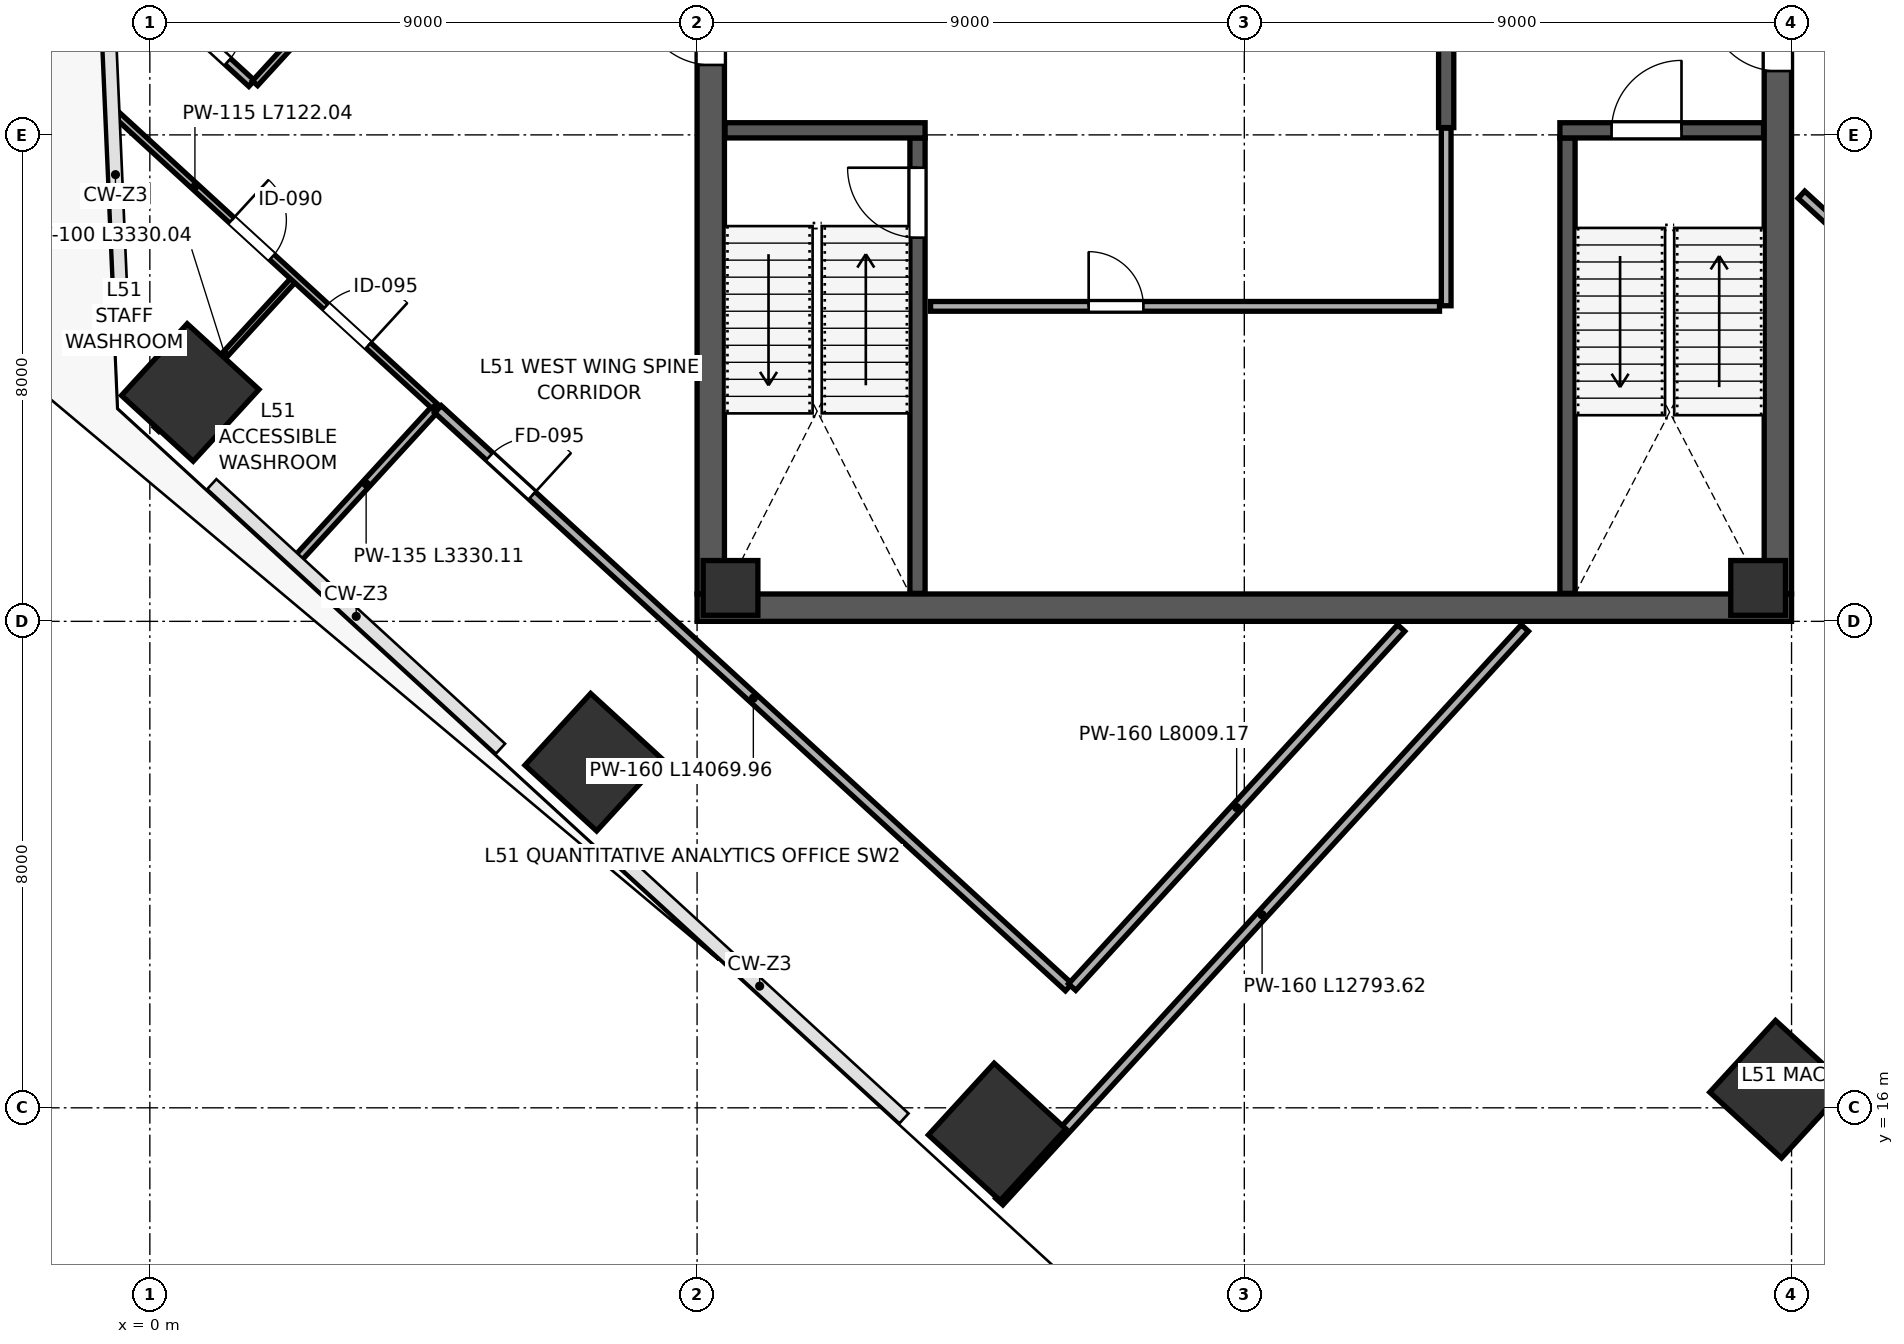
"""IFC4 building model, lengths in metres.
Left out: names, types, materials, properties, quantities, classifications, styles, units other than length and angle.
Written with IfcOpenShell. Run it as: python <this file> out.ifc"""

import sys

from ifc_helpers import new_model, si_unit, direction, frame, frame_2d, origin, origin_2d, place, context, subcontext, project, spatial, rectangle, extrude, source, transform, mapped, element, fill, save


model = new_model("IFC4")
c1 = context("Model", 3, precision=1e-05, world=origin(), true_north=direction((0.0, 1.0)))
c2 = subcontext(c1, "Body", "Model", "MODEL_VIEW")
j1 = project(units=[si_unit("LENGTHUNIT", "METRE"), si_unit("PLANEANGLEUNIT", "RADIAN")], contexts=[c1])
p1 = place(None, origin())
s1 = spatial("IfcSite", under=j1, at=p1, CompositionType="ELEMENT")
p2 = place(p1, origin())
s2 = spatial("IfcBuilding", under=s1, at=p2, CompositionType="ELEMENT")
p3 = place(p2, frame((0.0, 0.0, 229.0)))
s3 = spatial("IfcBuildingStorey", under=s2, at=p3, CompositionType="ELEMENT", Elevation=229.0)
m1 = source(origin(), c2, "Body", "SweptSolid", [
    extrude(rectangle(XDim=0.9, YDim=0.9, at=origin_2d()), origin(), (0.0, 0.0, 1.0), 4.198),
])
for number, where, z_axis, x_axis in (
    (1, (9.55, 24.55, 0.001), (0.0, 0.0, 1.0), (1.0, 0.0, 0.0)),
    (2, (26.45, 24.55, 0.001), (0.0, 0.0, 1.0), (1.0, 0.0, 0.0)),
):
    element("IfcColumn", number, at=place(p3, frame(where, z_axis=z_axis, x_axis=x_axis)), inside=s3, PredefinedType="COLUMN", context=c2, shape_type="MappedRepresentation", body=[
        mapped(m1, transform((0.0, 0.0, 0.0), scale=1.0)),
    ])
m2 = source(origin(), c2, "Body", "SweptSolid", [
    extrude(rectangle(XDim=1.6, YDim=1.6, at=origin_2d()), origin(), (0.0, 0.0, 1.0), 4.198),
])
for number, where, z_axis, x_axis in (
    (3, (0.664, 27.764, 0.001), (0.0, 0.0, 1.0), (-0.737, 0.676, 0.0)),
    (4, (7.299, 21.683, 0.001), (0.0, 0.0, 1.0), (-0.737, 0.676, 0.0)),
    (5, (13.935, 15.603, 0.001), (0.0, 0.0, 1.0), (-0.737, 0.676, 0.0)),
):
    element("IfcColumn", number, at=place(p3, frame(where, z_axis=z_axis, x_axis=x_axis)), inside=s3, PredefinedType="COLUMN", context=c2, shape_type="MappedRepresentation", body=[
        mapped(m2, transform((0.0, 0.0, 0.0), scale=1.0)),
    ])
m3 = source(origin(), c2, "Body", "SweptSolid", [
    extrude(rectangle(XDim=1.6, YDim=1.6, at=origin_2d()), origin(), (0.0, 0.0, 1.0), 4.198),
])
p4 = place(p3, frame((26.786, 16.306, 0.001), z_axis=(0.0, 0.0, 1.0), x_axis=(-0.73727733681, 0.675590207616, 0.0)))
e6 = element("IfcColumn", 6, at=p4, inside=s3, PredefinedType="COLUMN", context=c2, shape_type="MappedRepresentation", body=[
    mapped(m3, transform((0.0, 0.0, 0.0), scale=1.0)),
])
p5 = place(p3, frame((9.225, 24.45, 0.0), z_axis=(0.0, 0.0, 1.0), x_axis=(0.0, 1.0, 0.0)))
e7 = element("IfcWall", 7, at=p5, inside=s3, PredefinedType="SHEAR", context=c2, shape_type="SweptSolid", body=[
    extrude(rectangle(XDim=15.1, YDim=0.45, at=frame_2d((7.55, 0.0))), origin(), (0.0, 0.0, 1.0), 3.96),
])
p6 = place(p5, frame((8.7, 0.0, 0.0)))
e8 = element("IfcOpeningElement", 8, at=p6, cuts=e7, PredefinedType="OPENING", context=c2, shape_type="SweptSolid", body=[
    extrude(rectangle(XDim=1.15, YDim=2.2, at=frame_2d((0.575, 1.1))), frame((0.0, 0.235, 0.0), z_axis=(0.0, -1.0, 0.0), x_axis=(1.0, 0.0, 0.0)), (0.0, 0.0, 1.0), 0.47),
])
p7 = place(p3, frame((26.775, 24.45, 0.0), z_axis=(0.0, 0.0, 1.0), x_axis=(0.0, 1.0, 0.0)))
e9 = element("IfcWall", 9, at=p7, inside=s3, PredefinedType="SHEAR", context=c2, shape_type="SweptSolid", body=[
    extrude(rectangle(XDim=15.1, YDim=0.45, at=frame_2d((7.55, 0.0))), origin(), (0.0, 0.0, 1.0), 3.96),
])
p8 = place(p7, frame((8.6, 0.0, 0.0)))
e10 = element("IfcOpeningElement", 10, at=p8, cuts=e9, PredefinedType="OPENING", context=c2, shape_type="SweptSolid", body=[
    extrude(rectangle(XDim=1.15, YDim=2.2, at=frame_2d((0.575, 1.1))), frame((0.0, 0.235, 0.0), z_axis=(0.0, -1.0, 0.0), x_axis=(1.0, 0.0, 0.0)), (0.0, 0.0, 1.0), 0.47),
])
p9 = place(p3, frame((9.0, 24.225, 0.0), z_axis=(0.0, 0.0, 1.0), x_axis=(1.0, 0.0, 0.0)))
e11 = element("IfcWall", 11, at=p9, inside=s3, PredefinedType="SHEAR", context=c2, shape_type="SweptSolid", body=[
    extrude(rectangle(XDim=18.0, YDim=0.45, at=frame_2d((9.0, 0.0))), origin(), (0.0, 0.0, 1.0), 3.96),
])
p10 = place(p3, frame((12.625, 24.46, 0.0), z_axis=(0.0, 0.0, 1.0), x_axis=(0.0, 1.0, 0.0)))
e12 = element("IfcWall", 12, at=p10, inside=s3, PredefinedType="SHEAR", context=c2, shape_type="SweptSolid", body=[
    extrude(rectangle(XDim=7.49, YDim=0.25, at=frame_2d((3.745, 0.0))), origin(), (0.0, 0.0, 1.0), 3.96),
])
p11 = place(p10, frame((5.85, 0.0, 0.0)))
e13 = element("IfcOpeningElement", 13, at=p11, cuts=e12, PredefinedType="OPENING", context=c2, shape_type="SweptSolid", body=[
    extrude(rectangle(XDim=1.15, YDim=2.2, at=frame_2d((0.575, 1.1))), frame((0.0, 0.135, 0.0), z_axis=(0.0, -1.0, 0.0), x_axis=(1.0, 0.0, 0.0)), (0.0, 0.0, 1.0), 0.27),
])
p12 = place(p3, frame((9.46, 32.075, 0.0), z_axis=(0.0, 0.0, 1.0), x_axis=(1.0, 0.0, 0.0)))
e14 = element("IfcWall", 14, at=p12, inside=s3, PredefinedType="SHEAR", context=c2, shape_type="SweptSolid", body=[
    extrude(rectangle(XDim=3.29, YDim=0.25, at=frame_2d((1.645, 0.0))), origin(), (0.0, 0.0, 1.0), 3.96),
])
p13 = place(p3, frame((23.315, 24.46, 0.0), z_axis=(0.0, 0.0, 1.0), x_axis=(0.0, 1.0, 0.0)))
e15 = element("IfcWall", 15, at=p13, inside=s3, PredefinedType="SHEAR", context=c2, shape_type="SweptSolid", body=[
    extrude(rectangle(XDim=7.49, YDim=0.25, at=frame_2d((3.745, 0.0))), origin(), (0.0, 0.0, 1.0), 3.96),
])
p14 = place(p3, frame((23.19, 32.075, 0.0), z_axis=(0.0, 0.0, 1.0), x_axis=(1.0, 0.0, 0.0)))
e16 = element("IfcWall", 16, at=p14, inside=s3, PredefinedType="SHEAR", context=c2, shape_type="SweptSolid", body=[
    extrude(rectangle(XDim=3.35, YDim=0.25, at=frame_2d((1.675, 0.0))), origin(), (0.0, 0.0, 1.0), 3.96),
])
p15 = place(p14, frame((0.85, 0.0, 0.0)))
e17 = element("IfcOpeningElement", 17, at=p15, cuts=e16, PredefinedType="OPENING", context=c2, shape_type="SweptSolid", body=[
    extrude(rectangle(XDim=1.15, YDim=2.2, at=frame_2d((0.575, 1.1))), frame((0.0, 0.135, 0.0), z_axis=(0.0, -1.0, 0.0), x_axis=(1.0, 0.0, 0.0)), (0.0, 0.0, 1.0), 0.27),
])
p16 = place(p3, frame((21.32, 32.12, 0.0), z_axis=(0.0, 0.0, 1.0), x_axis=(0.0, 1.0, 0.0)))
e18 = element("IfcWall", 18, at=p16, inside=s3, PredefinedType="SHEAR", context=c2, shape_type="SweptSolid", body=[
    extrude(rectangle(XDim=7.42, YDim=0.25, at=frame_2d((3.71, 0.0))), origin(), (0.0, 0.0, 1.0), 3.96),
])
p17 = place(p16, frame((1.4, 0.0, 0.0)))
e19 = element("IfcOpeningElement", 19, at=p17, cuts=e18, PredefinedType="OPENING", context=c2, shape_type="SweptSolid", body=[
    extrude(rectangle(XDim=1.15, YDim=2.2, at=frame_2d((0.575, 1.1))), frame((0.0, 0.135, 0.0), z_axis=(0.0, -1.0, 0.0), x_axis=(1.0, 0.0, 0.0)), (0.0, 0.0, 1.0), 0.27),
])
p18 = place(p3, frame((12.84, 29.18, 0.0), z_axis=(0.0, 0.0, 1.0), x_axis=(1.0, 0.0, 0.0)))
e20 = element("IfcWall", 20, at=p18, inside=s3, PredefinedType="PARTITIONING", context=c2, shape_type="SweptSolid", body=[
    extrude(rectangle(XDim=8.37, YDim=0.16, at=frame_2d((4.185, 0.0))), origin(), (0.0, 0.0, 1.0), 3.96),
])
p19 = place(p18, frame((2.6, 0.0, 0.0)))
e21 = element("IfcOpeningElement", 21, at=p19, cuts=e20, PredefinedType="OPENING", context=c2, shape_type="SweptSolid", body=[
    extrude(rectangle(XDim=0.9, YDim=2.15, at=frame_2d((0.45, 1.075))), frame((0.0, 0.09, 0.0), z_axis=(0.0, -1.0, 0.0), x_axis=(1.0, 0.0, 0.0)), (0.0, 0.0, 1.0), 0.18),
])
p20 = place(p3, frame((21.32, 29.19, 0.0), z_axis=(0.0, 0.0, 1.0), x_axis=(0.0, 1.0, 0.0)))
e22 = element("IfcWall", 22, at=p20, inside=s3, PredefinedType="PARTITIONING", context=c2, shape_type="SweptSolid", body=[
    extrude(rectangle(XDim=2.92, YDim=0.16, at=frame_2d((1.46, 0.0))), origin(), (0.0, 0.0, 1.0), 3.96),
])
p21 = place(p3, frame((0.11, 27.159, 0.0), z_axis=(0.0, 0.0, 1.0), x_axis=(0.675605101048, 0.737263689217, 0.0)))
e23 = element("IfcWall", 23, at=p21, inside=s3, PredefinedType="PARTITIONING", context=c2, shape_type="SweptSolid", body=[
    extrude(rectangle(XDim=3.33, YDim=0.1, at=frame_2d((1.665, 0.0))), origin(), (0.0, 0.0, 1.0), 3.195),
])
p22 = place(p3, frame((2.432, 25.031, 0.0), z_axis=(0.0, 0.0, 1.0), x_axis=(0.675605101048, 0.737263689217, 0.0)))
e24 = element("IfcWall", 24, at=p22, inside=s3, PredefinedType="PARTITIONING", context=c2, shape_type="SweptSolid", body=[
    extrude(rectangle(XDim=3.33, YDim=0.135, at=frame_2d((1.665, 0.0))), origin(), (0.0, 0.0, 1.0), 3.195),
])
p23 = place(p3, frame((-0.571, 32.354, 0.0), z_axis=(0.0, 0.0, 1.0), x_axis=(0.737285035525, -0.675581805846, 0.0)))
e25 = element("IfcWall", 25, at=p23, inside=s3, PredefinedType="PARTITIONING", context=c2, shape_type="SweptSolid", body=[
    extrude(rectangle(XDim=7.122, YDim=0.115, at=frame_2d((3.561, 0.0))), origin(), (0.0, 0.0, 1.0), 3.96),
])
p24 = place(p23, frame((2.6, 0.0, 0.0)))
e26 = element("IfcOpeningElement", 26, at=p24, cuts=e25, PredefinedType="OPENING", context=c2, shape_type="SweptSolid", body=[
    extrude(rectangle(XDim=0.9, YDim=2.15, at=frame_2d((0.45, 1.075))), frame((0.0, 0.067, 0.0), z_axis=(0.0, -1.0, 0.0), x_axis=(1.0, 0.0, 0.0)), (0.0, 0.0, 1.0), 0.135),
])
p25 = place(p23, frame((4.7, 0.0, 0.0)))
e27 = element("IfcOpeningElement", 27, at=p25, cuts=e25, PredefinedType="OPENING", context=c2, shape_type="SweptSolid", body=[
    extrude(rectangle(XDim=0.95, YDim=2.15, at=frame_2d((0.475, 1.075))), frame((0.0, 0.067, 0.0), z_axis=(0.0, -1.0, 0.0), x_axis=(1.0, 0.0, 0.0)), (0.0, 0.0, 1.0), 0.135),
])
p26 = place(p3, frame((4.739, 27.489, 0.0), z_axis=(0.0, 0.0, 1.0), x_axis=(0.737276572642, -0.675591041558, 0.0)))
e28 = element("IfcWall", 28, at=p26, inside=s3, PredefinedType="PARTITIONING", context=c2, shape_type="SweptSolid", body=[
    extrude(rectangle(XDim=14.07, YDim=0.16, at=frame_2d((7.035, 0.0))), origin(), (0.0, 0.0, 1.0), 3.96),
])
p27 = place(p26, frame((1.15, 0.0, 0.0)))
e29 = element("IfcOpeningElement", 29, at=p27, cuts=e28, PredefinedType="OPENING", context=c2, shape_type="SweptSolid", body=[
    extrude(rectangle(XDim=0.95, YDim=2.15, at=frame_2d((0.475, 1.075))), frame((0.0, 0.09, 0.0), z_axis=(0.0, -1.0, 0.0), x_axis=(1.0, 0.0, 0.0)), (0.0, 0.0, 1.0), 0.18),
])
p28 = place(p3, frame((15.168, 17.986, 0.0), z_axis=(0.0, 0.0, 1.0), x_axis=(0.675616954369, 0.737252827034, 0.0)))
e30 = element("IfcWall", 30, at=p28, inside=s3, PredefinedType="PARTITIONING", context=c2, shape_type="SweptSolid", body=[
    extrude(rectangle(XDim=8.009, YDim=0.16, at=frame_2d((4.005, 0.0))), origin(), (0.0, 0.0, 1.0), 3.96),
])
p29 = place(p3, frame((27.163, 31.016, 0.0), z_axis=(0.0, 0.0, 1.0), x_axis=(0.737296869908, -0.675568890361, 0.0)))
e31 = element("IfcWall", 31, at=p29, inside=s3, PredefinedType="PARTITIONING", context=c2, shape_type="SweptSolid", body=[
    extrude(rectangle(XDim=1.42, YDim=0.16, at=frame_2d((0.71, 0.0))), origin(), (0.0, 0.0, 1.0), 3.96),
])
p30 = place(p3, frame((-0.044, 34.421, 0.0), z_axis=(0.0, 0.0, 1.0), x_axis=(0.73728894688, -0.675577537229, 0.0)))
e32 = element("IfcWall", 32, at=p30, inside=s3, PredefinedType="PARTITIONING", context=c2, shape_type="SweptSolid", body=[
    extrude(rectangle(XDim=2.33, YDim=0.135, at=frame_2d((1.165, 0.0))), origin(), (0.0, 0.0, 1.0), 3.96),
])
p31 = place(p30, frame((0.85, 0.0, 0.0)))
e33 = element("IfcOpeningElement", 33, at=p31, cuts=e32, PredefinedType="OPENING", context=c2, shape_type="SweptSolid", body=[
    extrude(rectangle(XDim=0.95, YDim=2.15, at=frame_2d((0.475, 1.075))), frame((0.0, 0.078, 0.0), z_axis=(0.0, -1.0, 0.0), x_axis=(1.0, 0.0, 0.0)), (0.0, 0.0, 1.0), 0.155),
])
p32 = place(p3, frame((1.73, 32.85, 0.0), z_axis=(0.0, 0.0, 1.0), x_axis=(0.675589845589, 0.737277668546, 0.0)))
e34 = element("IfcWall", 34, at=p32, inside=s3, PredefinedType="PARTITIONING", context=c2, shape_type="SweptSolid", body=[
    extrude(rectangle(XDim=26.742, YDim=0.115, at=frame_2d((13.371, 0.0))), origin(), (0.0, 0.0, 1.0), 3.96),
])
p33 = place(p3, frame((13.971, 14.458, 0.0), z_axis=(0.0, 0.0, 1.0), x_axis=(0.675595861889, 0.737272155583, 0.0)))
e35 = element("IfcWall", 35, at=p33, inside=s3, PredefinedType="PARTITIONING", context=c2, shape_type="SweptSolid", body=[
    extrude(rectangle(XDim=12.794, YDim=0.16, at=frame_2d((6.397, 0.0))), origin(), (0.0, 0.0, 1.0), 3.96),
])
m4 = source(origin(), c2, "Body", "SweptSolid", [
    extrude(rectangle(XDim=1.15, YDim=2.2, at=frame_2d((0.575, 1.1))), frame((0.0, 0.025, 0.0), z_axis=(0.0, -1.0, 0.0), x_axis=(1.0, 0.0, 0.0)), (0.0, 0.0, 1.0), 0.05),
])
p34 = place(p11, origin())
e36 = element("IfcDoor", 36, at=p34, inside=s3, OperationType="SINGLE_SWING_RIGHT", PredefinedType="DOOR", context=c2, shape_type="MappedRepresentation", body=[
    mapped(m4, transform((0.0, 0.0, 0.0), scale=1.0)),
])
fill(e13, e36)
p35 = place(p15, origin())
e37 = element("IfcDoor", 37, at=p35, inside=s3, OperationType="SINGLE_SWING_RIGHT", PredefinedType="DOOR", context=c2, shape_type="MappedRepresentation", body=[
    mapped(m4, transform((0.0, 0.0, 0.0), scale=1.0)),
])
fill(e17, e37)
m5 = source(origin(), c2, "Body", "SweptSolid", [
    extrude(rectangle(XDim=1.15, YDim=2.2, at=frame_2d((0.575, 1.1))), frame((0.0, 0.025, 0.0), z_axis=(0.0, -1.0, 0.0), x_axis=(1.0, 0.0, 0.0)), (0.0, 0.0, 1.0), 0.05),
])
p36 = place(p8, origin())
e38 = element("IfcDoor", 38, at=p36, inside=s3, OperationType="SINGLE_SWING_RIGHT", PredefinedType="DOOR", context=c2, shape_type="MappedRepresentation", body=[
    mapped(m5, transform((0.0, 0.0, 0.0), scale=1.0)),
])
fill(e10, e38)
p37 = place(p6, origin())
e39 = element("IfcDoor", 39, at=p37, inside=s3, OperationType="SINGLE_SWING_RIGHT", PredefinedType="DOOR", context=c2, shape_type="MappedRepresentation", body=[
    mapped(m5, transform((0.0, 0.0, 0.0), scale=1.0)),
])
fill(e8, e39)
m6 = source(origin(), c2, "Body", "SweptSolid", [
    extrude(rectangle(XDim=0.9, YDim=2.15, at=frame_2d((0.45, 1.075))), frame((0.0, 0.025, 0.0), z_axis=(0.0, -1.0, 0.0), x_axis=(1.0, 0.0, 0.0)), (0.0, 0.0, 1.0), 0.05),
])
p38 = place(p19, origin())
e40 = element("IfcDoor", 40, at=p38, inside=s3, OperationType="SINGLE_SWING_LEFT", PredefinedType="DOOR", context=c2, shape_type="MappedRepresentation", body=[
    mapped(m6, transform((0.0, 0.0, 0.0), scale=1.0)),
])
fill(e21, e40)
m7 = source(origin(), c2, "Body", "SweptSolid", [
    extrude(rectangle(XDim=0.9, YDim=2.15, at=frame_2d((0.45, 1.075))), frame((0.0, 0.025, 0.0), z_axis=(0.0, -1.0, 0.0), x_axis=(1.0, 0.0, 0.0)), (0.0, 0.0, 1.0), 0.05),
])
p39 = place(p24, origin())
e41 = element("IfcDoor", 41, at=p39, inside=s3, OperationType="SINGLE_SWING_LEFT", PredefinedType="DOOR", context=c2, shape_type="MappedRepresentation", body=[
    mapped(m7, transform((0.0, 0.0, 0.0), scale=1.0)),
])
fill(e26, e41)
m8 = source(origin(), c2, "Body", "SweptSolid", [
    extrude(rectangle(XDim=0.95, YDim=2.15, at=frame_2d((0.475, 1.075))), frame((0.0, 0.025, 0.0), z_axis=(0.0, -1.0, 0.0), x_axis=(1.0, 0.0, 0.0)), (0.0, 0.0, 1.0), 0.05),
])
p40 = place(p25, origin())
e42 = element("IfcDoor", 42, at=p40, inside=s3, OperationType="SINGLE_SWING_RIGHT", PredefinedType="DOOR", context=c2, shape_type="MappedRepresentation", body=[
    mapped(m8, transform((0.0, 0.0, 0.0), scale=1.0)),
])
fill(e27, e42)
m9 = source(origin(), c2, "Body", "SweptSolid", [
    extrude(rectangle(XDim=0.95, YDim=2.15, at=frame_2d((0.475, 1.075))), frame((0.0, 0.025, 0.0), z_axis=(0.0, -1.0, 0.0), x_axis=(1.0, 0.0, 0.0)), (0.0, 0.0, 1.0), 0.05),
])
p41 = place(p27, origin())
e43 = element("IfcDoor", 43, at=p41, inside=s3, OperationType="SINGLE_SWING_RIGHT", PredefinedType="DOOR", context=c2, shape_type="MappedRepresentation", body=[
    mapped(m9, transform((0.0, 0.0, 0.0), scale=1.0)),
])
fill(e29, e43)
p42 = place(p31, origin())
e44 = element("IfcDoor", 44, at=p42, inside=s3, OperationType="SINGLE_SWING_LEFT", PredefinedType="DOOR", context=c2, shape_type="MappedRepresentation", body=[
    mapped(m8, transform((0.0, 0.0, 0.0), scale=1.0)),
])
fill(e33, e44)
save(model, sys.argv[1])
